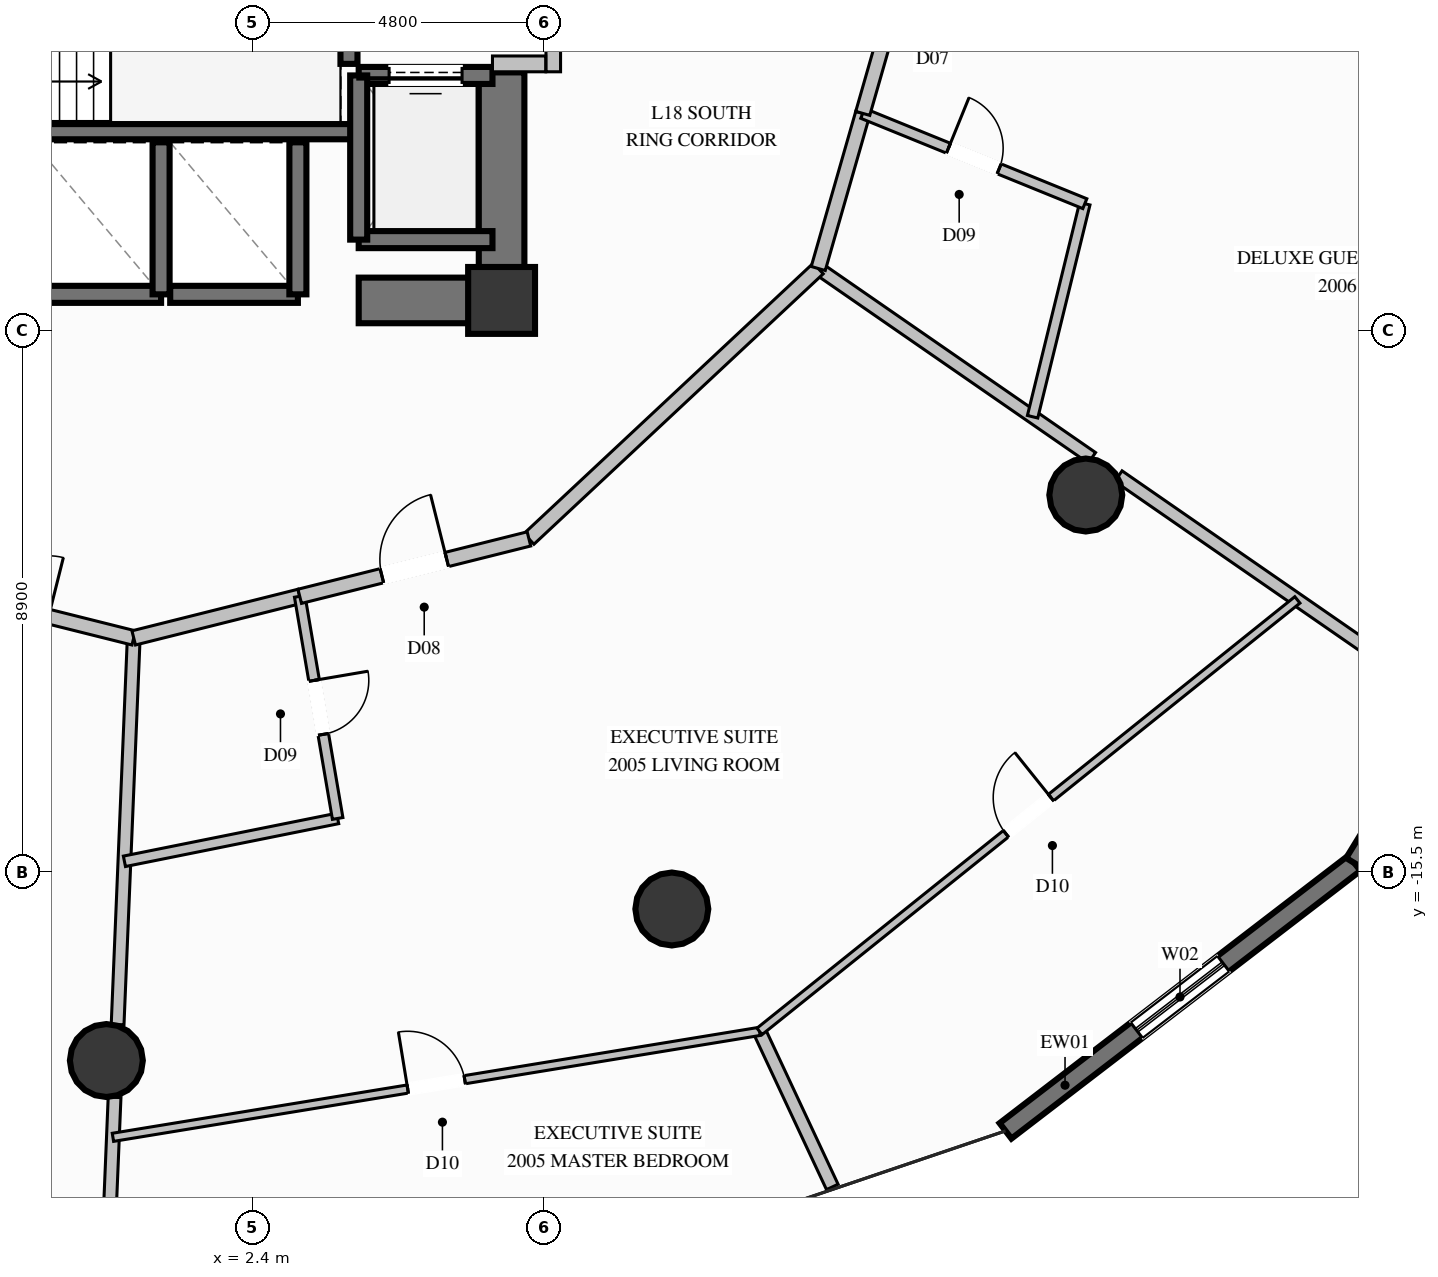
"""IFC4 building model, lengths in metres.
Left out: names, types, materials, properties, quantities, classifications, styles, units other than length and angle.
Written with IfcOpenShell. Run it as: python <this file> out.ifc"""

import sys

from ifc_helpers import new_model, si_unit, direction, frame, frame_2d, origin, origin_2d, place, context, subcontext, project, spatial, rectangle, circle, extrude, element, fill, save


model = new_model("IFC4")
c1 = context("Model", 3, precision=1e-05, world=origin(), true_north=direction((0.0, 1.0)))
c2 = subcontext(c1, "Body", "Model", "MODEL_VIEW")
j1 = project(units=[si_unit("LENGTHUNIT", "METRE"), si_unit("PLANEANGLEUNIT", "RADIAN")], contexts=[c1])
p1 = place(None, origin())
s1 = spatial("IfcSite", under=j1, at=p1, CompositionType="ELEMENT")
p2 = place(p1, origin())
s2 = spatial("IfcBuilding", under=s1, at=p2, CompositionType="ELEMENT")
p3 = place(p2, frame((0.0, 0.0, 75.2)))
s3 = spatial("IfcBuildingStorey", under=s2, at=p3, CompositionType="ELEMENT", Elevation=75.2)
p4 = place(p3, frame((6.5, -6.1, 0.0), z_axis=(0.0, 0.0, 1.0), x_axis=(1.0, 0.0, 0.0)))
e1 = element("IfcColumn", 1, at=p4, inside=s3, PredefinedType="COLUMN", context=c2, shape_type="SweptSolid", body=[
    extrude(rectangle(XDim=1.1, YDim=1.1, at=origin_2d()), origin(), (0.0, 0.0, 1.0), 3.6),
])
p5 = place(p3, frame((-4.13, -3.325, 0.0), z_axis=(0.0, 0.0, 1.0), x_axis=(1.0, 0.0, 0.0)))
e2 = element("IfcWall", 2, at=p5, inside=s3, PredefinedType="SOLIDWALL", context=c2, shape_type="SweptSolid", body=[
    extrude(rectangle(XDim=8.26, YDim=0.25, at=frame_2d((4.13, 0.0))), origin(), (0.0, 0.0, 1.0), 3.6),
])
p6 = place(p3, frame((4.15, -6.1, 0.0), z_axis=(0.0, 0.0, 1.0), x_axis=(1.0, 0.0, 0.0)))
e3 = element("IfcWall", 3, at=p6, inside=s3, PredefinedType="SHEAR", context=c2, shape_type="SweptSolid", body=[
    extrude(rectangle(XDim=1.975, YDim=0.75, at=frame_2d((0.988, 0.0))), origin(), (0.0, 0.0, 1.0), 3.6),
])
p7 = place(p3, frame((6.5, -6.475, 0.0), z_axis=(0.0, 0.0, 1.0), x_axis=(0.0, 1.0, 0.0)))
e4 = element("IfcWall", 4, at=p7, inside=s3, PredefinedType="SHEAR", context=c2, shape_type="SweptSolid", body=[
    extrude(rectangle(XDim=4.125, YDim=0.75, at=frame_2d((2.062, 0.0))), origin(), (0.0, 0.0, 1.0), 3.6),
])
for number, where, z_axis, x_axis in (
    (5, (0.0, -18.6, 0.0), (0.0, 0.0, 1.0), (1.0, 0.0, 0.0)),
    (6, (9.3, -16.108, 0.0), (0.0, 0.0, 1.0), (1.0, 0.0, 0.0)),
    (7, (16.108, -9.3, 0.0), (0.0, 0.0, 1.0), (1.0, 0.0, 0.0)),
):
    element("IfcColumn", number, at=place(p3, frame(where, z_axis=z_axis, x_axis=x_axis)), inside=s3, PredefinedType="COLUMN", context=c2, shape_type="SweptSolid", body=[
        extrude(circle(Radius=0.6, at=origin_2d()), origin(), (0.0, 0.0, 1.0), 3.6),
    ])
p8 = place(p3, frame((-0.655, -22.52, 0.0), z_axis=(0.0, 0.0, 1.0), x_axis=(-0.973849344218, 0.227194750746, 0.0)))
e8 = element("IfcWall", 8, at=p8, inside=s3, PredefinedType="SOLIDWALL", context=c2, shape_type="SweptSolid", body=[
    extrude(rectangle(XDim=8.412, YDim=0.32, at=frame_2d((4.206, 0.0))), origin(), (0.0, 0.0, 1.0), 3.34),
])
p9 = place(p8, frame((3.306, 0.0, 0.35)))
e9 = element("IfcOpeningElement", 9, at=p9, cuts=e8, PredefinedType="OPENING", context=c2, shape_type="SweptSolid", body=[
    extrude(rectangle(XDim=1.8, YDim=2.6, at=frame_2d((0.9, 1.3))), frame((0.0, 0.17, 0.0), z_axis=(0.0, -1.0, 0.0), x_axis=(1.0, 0.0, 0.0)), (0.0, 0.0, 1.0), 0.34),
])
p10 = place(p3, frame((20.527, -15.353, 0.0), z_axis=(0.0, 0.0, 1.0), x_axis=(-0.793329795388, -0.608792112095, 0.0)))
e10 = element("IfcWall", 10, at=p10, inside=s3, PredefinedType="SOLIDWALL", context=c2, shape_type="SweptSolid", body=[
    extrude(rectangle(XDim=7.234, YDim=0.32, at=frame_2d((3.617, 0.0))), origin(), (0.0, 0.0, 1.0), 3.34),
])
p11 = place(p10, frame((2.717, 0.0, 0.35)))
e11 = element("IfcOpeningElement", 11, at=p11, cuts=e10, PredefinedType="OPENING", context=c2, shape_type="SweptSolid", body=[
    extrude(rectangle(XDim=1.8, YDim=2.6, at=frame_2d((0.9, 1.3))), frame((0.0, 0.17, 0.0), z_axis=(0.0, -1.0, 0.0), x_axis=(1.0, 0.0, 0.0)), (0.0, 0.0, 1.0), 0.34),
])
p12 = place(p3, frame((24.143, -9.447, 0.0), z_axis=(0.0, 0.0, 1.0), x_axis=(-0.522158569524, -0.852848420455, 0.0)))
e12 = element("IfcWall", 12, at=p12, inside=s3, PredefinedType="SOLIDWALL", context=c2, shape_type="SweptSolid", body=[
    extrude(rectangle(XDim=6.925, YDim=0.32, at=frame_2d((3.462, 0.0))), origin(), (0.0, 0.0, 1.0), 3.34),
])
p13 = place(p12, frame((0.996, 0.0, 0.35)))
e13 = element("IfcOpeningElement", 13, at=p13, cuts=e12, PredefinedType="OPENING", context=c2, shape_type="SweptSolid", body=[
    extrude(rectangle(XDim=1.8, YDim=2.6, at=frame_2d((0.9, 1.3))), frame((0.0, 0.17, 0.0), z_axis=(0.0, -1.0, 0.0), x_axis=(1.0, 0.0, 0.0)), (0.0, 0.0, 1.0), 0.34),
])
p14 = place(p3, frame((-1.2, -6.0, 0.0), z_axis=(0.0, 0.0, 1.0), x_axis=(1.0, 0.0, 0.0)))
e14 = element("IfcWall", 14, at=p14, inside=s3, PredefinedType="SOLIDWALL", context=c2, shape_type="SweptSolid", body=[
    extrude(rectangle(XDim=2.1, YDim=0.28, at=frame_2d((1.05, 0.0))), origin(), (0.0, 0.0, 1.0), 3.34),
])
p15 = place(p3, frame((0.9, -6.0, 0.0), z_axis=(0.0, 0.0, 1.0), x_axis=(0.0, 1.0, 0.0)))
e15 = element("IfcWall", 15, at=p15, inside=s3, PredefinedType="SOLIDWALL", context=c2, shape_type="SweptSolid", body=[
    extrude(rectangle(XDim=2.5, YDim=0.28, at=frame_2d((1.25, 0.0))), origin(), (0.0, 0.0, 1.0), 3.34),
])
p16 = place(p3, frame((1.05, -6.0, 0.0), z_axis=(0.0, 0.0, 1.0), x_axis=(1.0, 0.0, 0.0)))
e16 = element("IfcWall", 16, at=p16, inside=s3, PredefinedType="SOLIDWALL", context=c2, shape_type="SweptSolid", body=[
    extrude(rectangle(XDim=2.1, YDim=0.28, at=frame_2d((1.05, 0.0))), origin(), (0.0, 0.0, 1.0), 3.34),
])
p17 = place(p3, frame((3.15, -6.0, 0.0), z_axis=(0.0, 0.0, 1.0), x_axis=(0.0, 1.0, 0.0)))
e17 = element("IfcWall", 17, at=p17, inside=s3, PredefinedType="SOLIDWALL", context=c2, shape_type="SweptSolid", body=[
    extrude(rectangle(XDim=2.5, YDim=0.28, at=frame_2d((1.25, 0.0))), origin(), (0.0, 0.0, 1.0), 3.34),
])
p18 = place(p3, frame((4.15, -5.1, 0.0), z_axis=(0.0, 0.0, 1.0), x_axis=(1.0, 0.0, 0.0)))
e18 = element("IfcWall", 18, at=p18, inside=s3, PredefinedType="SOLIDWALL", context=c2, shape_type="SweptSolid", body=[
    extrude(rectangle(XDim=2.2, YDim=0.28, at=frame_2d((1.1, 0.0))), origin(), (0.0, 0.0, 1.0), 3.34),
])
p19 = place(p3, frame((6.35, -2.4, 0.0), z_axis=(0.0, 0.0, 1.0), x_axis=(-1.0, 0.0, 0.0)))
e19 = element("IfcWall", 19, at=p19, inside=s3, PredefinedType="SOLIDWALL", context=c2, shape_type="SweptSolid", body=[
    extrude(rectangle(XDim=2.2, YDim=0.28, at=frame_2d((1.1, 0.0))), origin(), (0.0, 0.0, 1.0), 3.34),
])
p20 = place(p19, frame((0.5, 0.0, 0.0)))
e20 = element("IfcOpeningElement", 20, at=p20, cuts=e19, PredefinedType="OPENING", context=c2, shape_type="SweptSolid", body=[
    extrude(rectangle(XDim=1.2, YDim=2.2, at=frame_2d((0.6, 1.1))), frame((0.0, 0.15, 0.0), z_axis=(0.0, -1.0, 0.0), x_axis=(1.0, 0.0, 0.0)), (0.0, 0.0, 1.0), 0.3),
])
p21 = place(p3, frame((4.15, -2.4, 0.0), z_axis=(0.0, 0.0, 1.0), x_axis=(0.0, -1.0, 0.0)))
e21 = element("IfcWall", 21, at=p21, inside=s3, PredefinedType="SOLIDWALL", context=c2, shape_type="SweptSolid", body=[
    extrude(rectangle(XDim=2.7, YDim=0.28, at=frame_2d((1.35, 0.0))), origin(), (0.0, 0.0, 1.0), 3.34),
])
p22 = place(p3, frame((3.99, -2.21, 0.0), z_axis=(0.0, 0.0, 1.0), x_axis=(0.0, 1.0, 0.0)))
e22 = element("IfcWall", 22, at=p22, inside=s3, PredefinedType="SOLIDWALL", context=c2, shape_type="SweptSolid", body=[
    extrude(rectangle(XDim=5.46, YDim=0.28, at=frame_2d((2.73, 0.0))), origin(), (0.0, 0.0, 1.0), 3.34),
])
p23 = place(p22, frame((3.323, 0.0, 0.0)))
e23 = element("IfcOpeningElement", 23, at=p23, cuts=e22, PredefinedType="OPENING", context=c2, shape_type="SweptSolid", body=[
    extrude(rectangle(XDim=1.2, YDim=2.2, at=frame_2d((0.6, 1.1))), frame((0.0, 0.15, 0.0), z_axis=(0.0, -1.0, 0.0), x_axis=(1.0, 0.0, 0.0)), (0.0, 0.0, 1.0), 0.3),
])
p24 = place(p3, frame((7.35, -2.34, 0.0), z_axis=(0.0, 0.0, 1.0), x_axis=(0.0, 1.0, 0.0)))
e24 = element("IfcWall", 24, at=p24, inside=s3, PredefinedType="PARTITIONING", context=c2, shape_type="SweptSolid", body=[
    extrude(rectangle(XDim=5.07, YDim=0.24, at=frame_2d((2.535, 0.0))), origin(), (0.0, 0.0, 1.0), 2.425),
])
p25 = place(p24, frame((2.548, 0.0, 0.0)))
e25 = element("IfcOpeningElement", 25, at=p25, cuts=e24, PredefinedType="OPENING", context=c2, shape_type="SweptSolid", body=[
    extrude(rectangle(XDim=1.15, YDim=2.2, at=frame_2d((0.575, 1.1))), frame((0.0, 0.13, 0.0), z_axis=(0.0, -1.0, 0.0), x_axis=(1.0, 0.0, 0.0)), (0.0, 0.0, 1.0), 0.26),
])
p26 = place(p3, frame((6.35, -2.21, 0.0), z_axis=(0.0, 0.0, 1.0), x_axis=(1.0, 0.0, 0.0)))
e26 = element("IfcWall", 26, at=p26, inside=s3, PredefinedType="PARTITIONING", context=c2, shape_type="SweptSolid", body=[
    extrude(rectangle(XDim=0.875, YDim=0.26, at=frame_2d((0.438, 0.0))), origin(), (0.0, 0.0, 1.0), 3.34),
])
p27 = place(p3, frame((0.45, -11.65, 0.0), z_axis=(0.0, 0.0, 1.0), x_axis=(-0.041625757429, -0.999133272551, 0.0)))
e27 = element("IfcWall", 27, at=p27, inside=s3, PredefinedType="PARTITIONING", context=c2, shape_type="SweptSolid", body=[
    extrude(rectangle(XDim=6.364, YDim=0.21, at=frame_2d((3.182, 0.0))), origin(), (0.0, 0.0, 1.0), 3.34),
])
p28 = place(p3, frame((0.135, -19.205, 0.0), z_axis=(0.0, 0.0, 1.0), x_axis=(-0.041493222314, -0.999138785406, 0.0)))
e28 = element("IfcWall", 28, at=p28, inside=s3, PredefinedType="PARTITIONING", context=c2, shape_type="SweptSolid", body=[
    extrude(rectangle(XDim=3.254, YDim=0.21, at=frame_2d((1.627, 0.0))), origin(), (0.0, 0.0, 1.0), 3.34),
])
p29 = place(p3, frame((11.708, -5.575, 0.0), z_axis=(0.0, 0.0, 1.0), x_axis=(0.822450672887, -0.568836435777, 0.0)))
e29 = element("IfcWall", 29, at=p29, inside=s3, PredefinedType="PARTITIONING", context=c2, shape_type="SweptSolid", body=[
    extrude(rectangle(XDim=5.473, YDim=0.21, at=frame_2d((2.736, 0.0))), origin(), (0.0, 0.0, 1.0), 2.709),
])
p30 = place(p3, frame((16.645, -8.989, 0.0), z_axis=(0.0, 0.0, 1.0), x_axis=(0.822389116531, -0.568925426581, 0.0)))
e30 = element("IfcWall", 30, at=p30, inside=s3, PredefinedType="PARTITIONING", context=c2, shape_type="SweptSolid", body=[
    extrude(rectangle(XDim=6.604, YDim=0.21, at=frame_2d((3.302, 0.0))), origin(), (0.0, 0.0, 1.0), 3.34),
])
p31 = place(p3, frame((-3.32, -10.706, 0.0), z_axis=(0.0, 0.0, 1.0), x_axis=(0.970061149619, -0.24286079552, 0.0)))
e31 = element("IfcWall", 31, at=p31, inside=s3, PredefinedType="PARTITIONING", context=c2, shape_type="SweptSolid", body=[
    extrude(rectangle(XDim=3.886, YDim=0.24, at=frame_2d((1.943, 0.0))), origin(), (0.0, 0.0, 1.0), 3.34),
])
p32 = place(p31, frame((1.443, 0.0, 0.0)))
e32 = element("IfcOpeningElement", 32, at=p32, cuts=e31, PredefinedType="OPENING", context=c2, shape_type="SweptSolid", body=[
    extrude(rectangle(XDim=1.0, YDim=2.2, at=frame_2d((0.5, 1.1))), frame((0.0, 0.13, 0.0), z_axis=(0.0, -1.0, 0.0), x_axis=(1.0, 0.0, 0.0)), (0.0, 0.0, 1.0), 0.26),
])
p33 = place(p3, frame((0.45, -11.65, 0.0), z_axis=(0.0, 0.0, 1.0), x_axis=(0.97003013248, 0.242984654004, 0.0)))
e33 = element("IfcWall", 33, at=p33, inside=s3, PredefinedType="PARTITIONING", context=c2, shape_type="SweptSolid", body=[
    extrude(rectangle(XDim=2.814, YDim=0.24, at=frame_2d((1.407, 0.0))), origin(), (0.0, 0.0, 1.0), 3.34),
])
p34 = place(p3, frame((0.297, -15.324, 0.0), z_axis=(0.0, 0.0, 1.0), x_axis=(0.980380660632, 0.197113571979, 0.0)))
e34 = element("IfcWall", 34, at=p34, inside=s3, PredefinedType="PLUMBINGWALL", context=c2, shape_type="SweptSolid", body=[
    extrude(rectangle(XDim=3.577, YDim=0.175, at=frame_2d((1.789, 0.0))), origin(), (0.0, 0.0, 1.0), 3.34),
])
p35 = place(p3, frame((3.18, -10.966, 0.0), z_axis=(0.0, 0.0, 1.0), x_axis=(0.168393266083, -0.985719893244, 0.0)))
e35 = element("IfcWall", 35, at=p35, inside=s3, PredefinedType="PLUMBINGWALL", context=c2, shape_type="SweptSolid", body=[
    extrude(rectangle(XDim=3.706, YDim=0.175, at=frame_2d((1.853, 0.0))), origin(), (0.0, 0.0, 1.0), 3.34),
])
p36 = place(p35, frame((1.403, 0.0, 0.0)))
e36 = element("IfcOpeningElement", 36, at=p36, cuts=e35, PredefinedType="OPENING", context=c2, shape_type="SweptSolid", body=[
    extrude(rectangle(XDim=0.9, YDim=2.1, at=frame_2d((0.45, 1.05))), frame((0.0, 0.098, 0.0), z_axis=(0.0, -1.0, 0.0), x_axis=(1.0, 0.0, 0.0)), (0.0, 0.0, 1.0), 0.195),
])
p37 = place(p3, frame((10.742, -18.121, 0.0), z_axis=(0.0, 0.0, 1.0), x_axis=(0.423860139743, -0.905727653292, 0.0)))
e37 = element("IfcWall", 37, at=p37, inside=s3, PredefinedType="PARTITIONING", context=c2, shape_type="SweptSolid", body=[
    extrude(rectangle(XDim=2.824, YDim=0.21, at=frame_2d((1.412, 0.0))), origin(), (0.0, 0.0, 1.0), 3.34),
])
p38 = place(p3, frame((6.95, -10.022, 0.0), z_axis=(0.0, 0.0, 1.0), x_axis=(0.730582633102, 0.682824293804, 0.0)))
e38 = element("IfcWall", 38, at=p38, inside=s3, PredefinedType="PARTITIONING", context=c2, shape_type="SweptSolid", body=[
    extrude(rectangle(XDim=6.513, YDim=0.24, at=frame_2d((3.256, 0.0))), origin(), (0.0, 0.0, 1.0), 3.34),
])
p39 = place(p3, frame((3.18, -10.966, 0.0), z_axis=(0.0, 0.0, 1.0), x_axis=(0.970046348371, 0.242919908636, 0.0)))
e39 = element("IfcWall", 39, at=p39, inside=s3, PredefinedType="PARTITIONING", context=c2, shape_type="SweptSolid", body=[
    extrude(rectangle(XDim=3.886, YDim=0.24, at=frame_2d((1.943, 0.0))), origin(), (0.0, 0.0, 1.0), 3.34),
])
p40 = place(p39, frame((1.393, 0.0, 0.0)))
e40 = element("IfcOpeningElement", 40, at=p40, cuts=e39, PredefinedType="OPENING", context=c2, shape_type="SweptSolid", body=[
    extrude(rectangle(XDim=1.1, YDim=2.3, at=frame_2d((0.55, 1.15))), frame((0.0, 0.13, 0.0), z_axis=(0.0, -1.0, 0.0), x_axis=(1.0, 0.0, 0.0)), (0.0, 0.0, 1.0), 0.26),
])
p41 = place(p3, frame((0.108, -19.863, 0.0), z_axis=(0.0, 0.0, 1.0), x_axis=(0.986847521354, 0.161653857356, 0.0)))
e41 = element("IfcWall", 41, at=p41, inside=s3, PredefinedType="PARTITIONING", context=c2, shape_type="SweptSolid", body=[
    extrude(rectangle(XDim=10.776, YDim=0.135, at=frame_2d((5.388, 0.0))), origin(), (0.0, 0.0, 1.0), 3.34),
])
p42 = place(p41, frame((4.913, 0.0, 0.0)))
e42 = element("IfcOpeningElement", 42, at=p42, cuts=e41, PredefinedType="OPENING", context=c2, shape_type="SweptSolid", body=[
    extrude(rectangle(XDim=0.95, YDim=2.1, at=frame_2d((0.475, 1.05))), frame((0.0, 0.078, 0.0), z_axis=(0.0, -1.0, 0.0), x_axis=(1.0, 0.0, 0.0)), (0.0, 0.0, 1.0), 0.155),
])
p43 = place(p3, frame((10.742, -18.121, 0.0), z_axis=(0.0, 0.0, 1.0), x_axis=(0.780032185097, 0.625739394807, 0.0)))
e43 = element("IfcWall", 43, at=p43, inside=s3, PredefinedType="PARTITIONING", context=c2, shape_type="SweptSolid", body=[
    extrude(rectangle(XDim=11.341, YDim=0.135, at=frame_2d((5.67, 0.0))), origin(), (0.0, 0.0, 1.0), 3.34),
])
p44 = place(p43, frame((5.195, 0.0, 0.0)))
e44 = element("IfcOpeningElement", 44, at=p44, cuts=e43, PredefinedType="OPENING", context=c2, shape_type="SweptSolid", body=[
    extrude(rectangle(XDim=0.95, YDim=2.1, at=frame_2d((0.475, 1.05))), frame((0.0, 0.078, 0.0), z_axis=(0.0, -1.0, 0.0), x_axis=(1.0, 0.0, 0.0)), (0.0, 0.0, 1.0), 0.155),
])
p45 = place(p3, frame((11.708, -5.575, 0.0), z_axis=(0.0, 0.0, 1.0), x_axis=(0.275790140823, 0.961217872402, 0.0)))
e45 = element("IfcWall", 45, at=p45, inside=s3, PredefinedType="PARTITIONING", context=c2, shape_type="SweptSolid", body=[
    extrude(rectangle(XDim=2.654, YDim=0.24, at=frame_2d((1.327, 0.0))), origin(), (0.0, 0.0, 1.0), 3.34),
])
p46 = place(p3, frame((15.233, -8.013, 0.0), z_axis=(0.0, 0.0, 1.0), x_axis=(0.238138425117, 0.971231224005, 0.0)))
e46 = element("IfcWall", 46, at=p46, inside=s3, PredefinedType="PLUMBINGWALL", context=c2, shape_type="SweptSolid", body=[
    extrude(rectangle(XDim=3.608, YDim=0.175, at=frame_2d((1.804, 0.0))), origin(), (0.0, 0.0, 1.0), 3.34),
])
p47 = place(p3, frame((12.44, -3.024, 0.0), z_axis=(0.0, 0.0, 1.0), x_axis=(0.926338988139, -0.376690959613, 0.0)))
e47 = element("IfcWall", 47, at=p47, inside=s3, PredefinedType="PLUMBINGWALL", context=c2, shape_type="SweptSolid", body=[
    extrude(rectangle(XDim=3.943, YDim=0.175, at=frame_2d((1.971, 0.0))), origin(), (0.0, 0.0, 1.0), 3.34),
])
p48 = place(p47, frame((1.521, 0.0, 0.0)))
e48 = element("IfcOpeningElement", 48, at=p48, cuts=e47, PredefinedType="OPENING", context=c2, shape_type="SweptSolid", body=[
    extrude(rectangle(XDim=0.9, YDim=2.1, at=frame_2d((0.45, 1.05))), frame((0.0, 0.098, 0.0), z_axis=(0.0, -1.0, 0.0), x_axis=(1.0, 0.0, 0.0)), (0.0, 0.0, 1.0), 0.195),
])
p49 = place(p3, frame((12.44, -3.024, 0.0), z_axis=(0.0, 0.0, 1.0), x_axis=(0.275521481409, 0.961294914832, 0.0)))
e49 = element("IfcWall", 49, at=p49, inside=s3, PredefinedType="PARTITIONING", context=c2, shape_type="SweptSolid", body=[
    extrude(rectangle(XDim=3.666, YDim=0.24, at=frame_2d((1.833, 0.0))), origin(), (0.0, 0.0, 1.0), 3.34),
])
p50 = place(p49, frame((1.333, 0.0, 0.0)))
e50 = element("IfcOpeningElement", 50, at=p50, cuts=e49, PredefinedType="OPENING", context=c2, shape_type="SweptSolid", body=[
    extrude(rectangle(XDim=1.0, YDim=2.2, at=frame_2d((0.5, 1.1))), frame((0.0, 0.13, 0.0), z_axis=(0.0, -1.0, 0.0), x_axis=(1.0, 0.0, 0.0)), (0.0, 0.0, 1.0), 0.26),
])
p51 = place(p11, origin())
e51 = element("IfcWindow", 51, at=p51, inside=s3, PartitioningType="SINGLE_PANEL", PredefinedType="WINDOW", context=c2, shape_type="SweptSolid", body=[
    extrude(rectangle(XDim=1.8, YDim=2.6, at=frame_2d((0.9, 1.3))), frame((0.0, 0.03, 0.0), z_axis=(0.0, -1.0, 0.0), x_axis=(1.0, 0.0, 0.0)), (0.0, 0.0, 1.0), 0.06),
])
fill(e11, e51)
p52 = place(p20, origin())
e52 = element("IfcDoor", 52, at=p52, inside=s3, OperationType="SLIDING_TO_LEFT", PredefinedType="DOOR", context=c2, shape_type="SweptSolid", body=[
    extrude(rectangle(XDim=1.2, YDim=2.2, at=frame_2d((0.6, 1.1))), frame((0.0, 0.025, 0.0), z_axis=(0.0, -1.0, 0.0), x_axis=(1.0, 0.0, 0.0)), (0.0, 0.0, 1.0), 0.05),
])
fill(e20, e52)
p53 = place(p36, origin())
e53 = element("IfcDoor", 53, at=p53, inside=s3, OperationType="SINGLE_SWING_LEFT", PredefinedType="DOOR", context=c2, shape_type="SweptSolid", body=[
    extrude(rectangle(XDim=0.9, YDim=2.1, at=frame_2d((0.45, 1.05))), frame((0.0, 0.025, 0.0), z_axis=(0.0, -1.0, 0.0), x_axis=(1.0, 0.0, 0.0)), (0.0, 0.0, 1.0), 0.05),
])
fill(e36, e53)
p54 = place(p40, origin())
e54 = element("IfcDoor", 54, at=p54, inside=s3, OperationType="SINGLE_SWING_RIGHT", PredefinedType="DOOR", context=c2, shape_type="SweptSolid", body=[
    extrude(rectangle(XDim=1.1, YDim=2.3, at=frame_2d((0.55, 1.15))), frame((0.0, 0.025, 0.0), z_axis=(0.0, -1.0, 0.0), x_axis=(1.0, 0.0, 0.0)), (0.0, 0.0, 1.0), 0.05),
])
fill(e40, e54)
p55 = place(p42, origin())
e55 = element("IfcDoor", 55, at=p55, inside=s3, OperationType="SINGLE_SWING_LEFT", PredefinedType="DOOR", context=c2, shape_type="SweptSolid", body=[
    extrude(rectangle(XDim=0.95, YDim=2.1, at=frame_2d((0.475, 1.05))), frame((0.0, 0.025, 0.0), z_axis=(0.0, -1.0, 0.0), x_axis=(1.0, 0.0, 0.0)), (0.0, 0.0, 1.0), 0.05),
])
fill(e42, e55)
p56 = place(p44, origin())
e56 = element("IfcDoor", 56, at=p56, inside=s3, OperationType="SINGLE_SWING_RIGHT", PredefinedType="DOOR", context=c2, shape_type="SweptSolid", body=[
    extrude(rectangle(XDim=0.95, YDim=2.1, at=frame_2d((0.475, 1.05))), frame((0.0, 0.025, 0.0), z_axis=(0.0, -1.0, 0.0), x_axis=(1.0, 0.0, 0.0)), (0.0, 0.0, 1.0), 0.05),
])
fill(e44, e56)
p57 = place(p48, origin())
e57 = element("IfcDoor", 57, at=p57, inside=s3, OperationType="SINGLE_SWING_LEFT", PredefinedType="DOOR", context=c2, shape_type="SweptSolid", body=[
    extrude(rectangle(XDim=0.9, YDim=2.1, at=frame_2d((0.45, 1.05))), frame((0.0, 0.025, 0.0), z_axis=(0.0, -1.0, 0.0), x_axis=(1.0, 0.0, 0.0)), (0.0, 0.0, 1.0), 0.05),
])
fill(e48, e57)
save(model, sys.argv[1])
